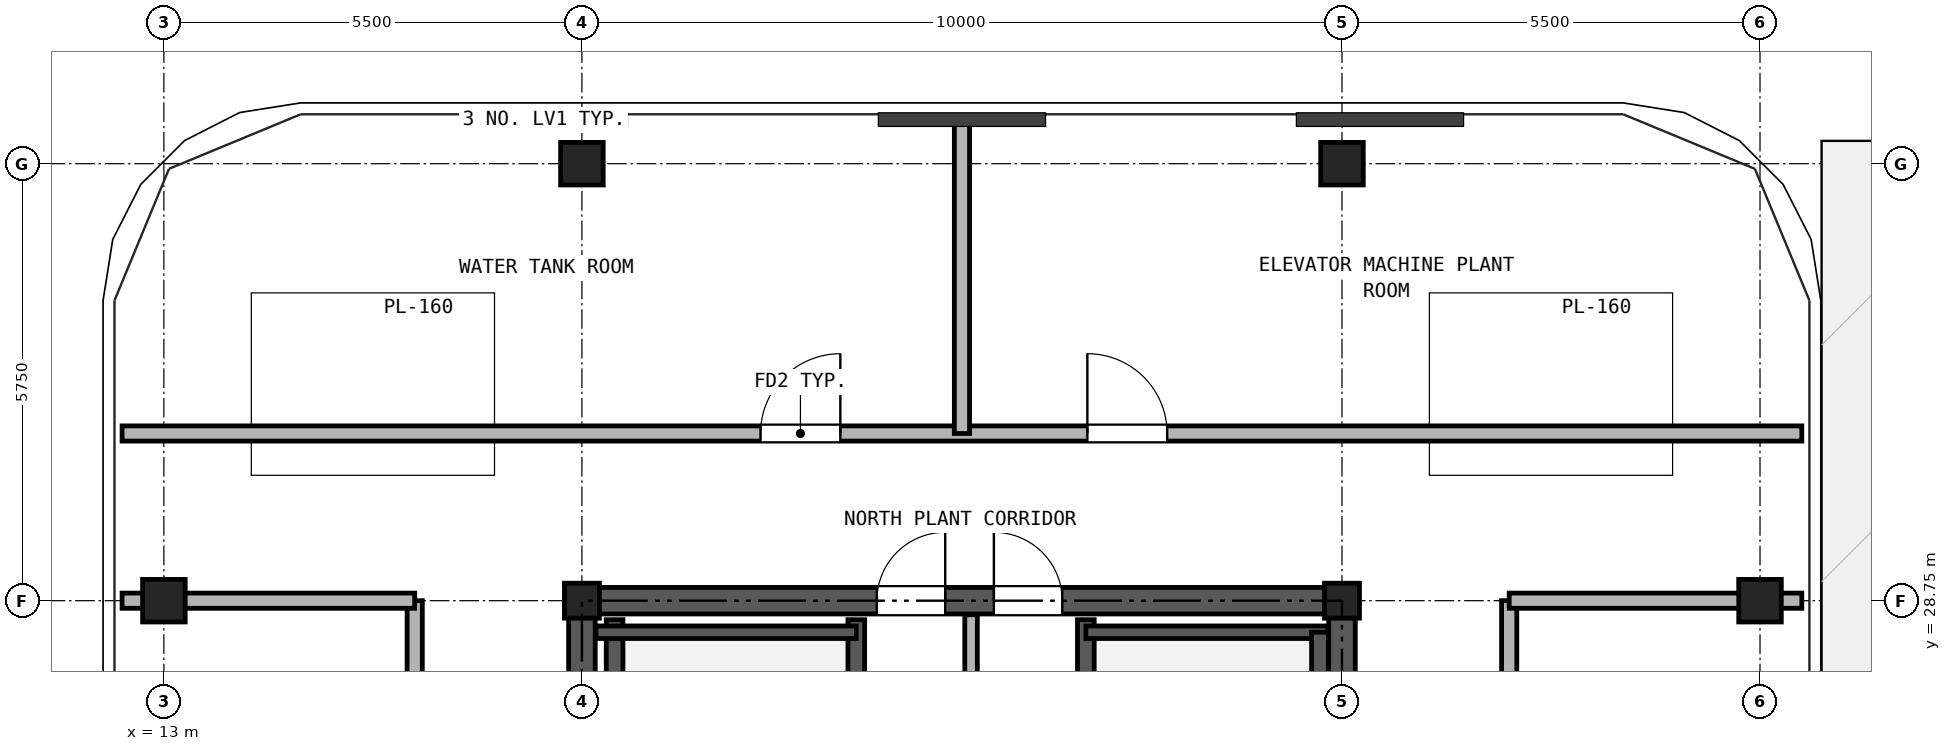
"""IFC4 building model, lengths in metres.
Left out: names, types, materials, properties, quantities, classifications, styles, units other than length and angle.
Written with IfcOpenShell. Run it as: python <this file> out.ifc"""

import sys

from ifc_helpers import new_model, si_unit, direction, frame, frame_2d, origin, origin_2d, place, context, subcontext, project, spatial, rectangle, hollow_rectangle, extrude, source, transform, mapped, element, fill, save


model = new_model("IFC4")
c1 = context("Model", 3, precision=1e-05, world=origin(), true_north=direction((0.0, 1.0)))
c2 = subcontext(c1, "Body", "Model", "MODEL_VIEW")
j1 = project(units=[si_unit("LENGTHUNIT", "METRE"), si_unit("PLANEANGLEUNIT", "RADIAN")], contexts=[c1])
p1 = place(None, origin())
s1 = spatial("IfcSite", under=j1, at=p1, CompositionType="ELEMENT")
p2 = place(p1, origin())
s2 = spatial("IfcBuilding", under=s1, at=p2, CompositionType="ELEMENT")
p3 = place(p2, frame((0.0, 0.0, 285.7)))
s3 = spatial("IfcBuildingStorey", under=s2, at=p3, CompositionType="ELEMENT", Elevation=285.7)
m1 = source(origin(), c2, "Body", "SweptSolid", [
    extrude(hollow_rectangle(XDim=0.56, YDim=0.56, WallThickness=0.03, at=origin_2d()), origin(), (0.0, 0.0, 1.0), 3.38),
])
for number, where, z_axis, x_axis in (
    (1, (18.5, 34.5, 0.0), (0.0, 0.0, 1.0), (1.0, 0.0, 0.0)),
    (2, (28.5, 34.5, 0.0), (0.0, 0.0, 1.0), (1.0, 0.0, 0.0)),
    (3, (13.0, 28.75, 0.0), (0.0, 0.0, 1.0), (1.0, 0.0, 0.0)),
    (4, (34.0, 28.75, 0.0), (0.0, 0.0, 1.0), (1.0, 0.0, 0.0)),
):
    element("IfcColumn", number, at=place(p3, frame(where, z_axis=z_axis, x_axis=x_axis)), inside=s3, PredefinedType="COLUMN", context=c2, shape_type="MappedRepresentation", body=[
        mapped(m1, transform((0.0, 0.0, 0.0), x_axis=(1.0, 0.0, 0.0), y_axis=(0.0, 1.0, 0.0), z_axis=(0.0, 0.0, 1.0), scale=1.0)),
    ])
m2 = source(origin(), c2, "Body", "SweptSolid", [
    extrude(hollow_rectangle(XDim=0.46, YDim=0.46, WallThickness=0.025, at=origin_2d()), origin(), (0.0, 0.0, 1.0), 3.38),
])
for number, where, z_axis, x_axis in (
    (5, (18.5, 28.75, 0.0), (0.0, 0.0, 1.0), (1.0, 0.0, 0.0)),
    (6, (28.5, 28.75, 0.0), (0.0, 0.0, 1.0), (1.0, 0.0, 0.0)),
):
    element("IfcColumn", number, at=place(p3, frame(where, z_axis=z_axis, x_axis=x_axis)), inside=s3, PredefinedType="COLUMN", context=c2, shape_type="MappedRepresentation", body=[
        mapped(m2, transform((0.0, 0.0, 0.0), x_axis=(1.0, 0.0, 0.0), y_axis=(0.0, 1.0, 0.0), z_axis=(0.0, 0.0, 1.0), scale=1.0)),
    ])
p4 = place(p3, frame((18.325, 28.75, 0.0), z_axis=(0.0, 0.0, 1.0), x_axis=(1.0, 0.0, 0.0)))
e7 = element("IfcWall", 7, at=p4, inside=s3, PredefinedType="SHEAR", context=c2, shape_type="SweptSolid", body=[
    extrude(rectangle(XDim=10.35, YDim=0.35, at=frame_2d((5.175, 0.0))), origin(), (0.0, 0.0, 1.0), 3.38),
])
p5 = place(p4, frame((4.055, 0.0, 0.0)))
e8 = element("IfcOpeningElement", 8, at=p5, cuts=e7, PredefinedType="OPENING", context=c2, shape_type="SweptSolid", body=[
    extrude(rectangle(XDim=0.9, YDim=2.05, at=frame_2d((0.45, 1.025))), frame((0.0, 0.185, 0.0), z_axis=(0.0, -1.0, 0.0), x_axis=(1.0, 0.0, 0.0)), (0.0, 0.0, 1.0), 0.37),
])
p6 = place(p4, frame((5.595, 0.0, 0.0)))
e9 = element("IfcOpeningElement", 9, at=p6, cuts=e7, PredefinedType="OPENING", context=c2, shape_type="SweptSolid", body=[
    extrude(rectangle(XDim=0.9, YDim=2.05, at=frame_2d((0.45, 1.025))), frame((0.0, 0.185, 0.0), z_axis=(0.0, -1.0, 0.0), x_axis=(1.0, 0.0, 0.0)), (0.0, 0.0, 1.0), 0.37),
])
p7 = place(p3, frame((18.5, 11.675, 0.0), z_axis=(0.0, 0.0, 1.0), x_axis=(0.0, 1.0, 0.0)))
e10 = element("IfcWall", 10, at=p7, inside=s3, PredefinedType="SHEAR", context=c2, shape_type="SweptSolid", body=[
    extrude(rectangle(XDim=16.9, YDim=0.35, at=frame_2d((8.45, 0.0))), origin(), (0.0, 0.0, 1.0), 3.38),
])
p8 = place(p7, frame((7.475, 0.0, 0.0)))
e11 = element("IfcOpeningElement", 11, at=p8, cuts=e10, PredefinedType="OPENING", context=c2, shape_type="SweptSolid", body=[
    extrude(rectangle(XDim=1.15, YDim=2.2, at=frame_2d((0.575, 1.1))), frame((0.0, 0.185, 0.0), z_axis=(0.0, -1.0, 0.0), x_axis=(1.0, 0.0, 0.0)), (0.0, 0.0, 1.0), 0.37),
])
p9 = place(p3, frame((28.5, 11.675, 0.0), z_axis=(0.0, 0.0, 1.0), x_axis=(0.0, 1.0, 0.0)))
e12 = element("IfcWall", 12, at=p9, inside=s3, PredefinedType="SHEAR", context=c2, shape_type="SweptSolid", body=[
    extrude(rectangle(XDim=16.9, YDim=0.35, at=frame_2d((8.45, 0.0))), origin(), (0.0, 0.0, 1.0), 3.38),
])
p10 = place(p9, frame((7.475, 0.0, 0.0)))
e13 = element("IfcOpeningElement", 13, at=p10, cuts=e12, PredefinedType="OPENING", context=c2, shape_type="SweptSolid", body=[
    extrude(rectangle(XDim=1.15, YDim=2.2, at=frame_2d((0.575, 1.1))), frame((0.0, 0.185, 0.0), z_axis=(0.0, -1.0, 0.0), x_axis=(1.0, 0.0, 0.0)), (0.0, 0.0, 1.0), 0.37),
])
for number, where, z_axis, x_axis in (
    (14, (18.93, 21.39, 0.0), (0.0, 0.0, 1.0), (0.0, 1.0, 0.0)),
    (15, (22.11, 21.39, 0.0), (0.0, 0.0, 1.0), (0.0, 1.0, 0.0)),
    (16, (25.13, 21.39, 0.0), (0.0, 0.0, 1.0), (0.0, 1.0, 0.0)),
):
    element("IfcWall", number, at=place(p3, frame(where, z_axis=z_axis, x_axis=x_axis)), inside=s3, PredefinedType="SOLIDWALL", context=c2, shape_type="SweptSolid", body=[
        extrude(rectangle(XDim=7.11, YDim=0.22, at=frame_2d((3.555, 0.0))), origin(), (0.0, 0.0, 1.0), 3.38),
    ])
p11 = place(p3, frame((18.685, 28.335, 0.0), z_axis=(0.0, 0.0, 1.0), x_axis=(1.0, 0.0, 0.0)))
e17 = element("IfcWall", 17, at=p11, inside=s3, PredefinedType="PARTITIONING", context=c2, shape_type="SweptSolid", body=[
    extrude(rectangle(XDim=3.425, YDim=0.165, at=frame_2d((1.712, 0.0))), origin(), (0.0, 0.0, 1.0), 3.38),
])
p12 = place(p3, frame((25.13, 28.335, 0.0), z_axis=(0.0, 0.0, 1.0), x_axis=(1.0, 0.0, 0.0)))
e18 = element("IfcWall", 18, at=p12, inside=s3, PredefinedType="PARTITIONING", context=c2, shape_type="SweptSolid", body=[
    extrude(rectangle(XDim=3.185, YDim=0.165, at=frame_2d((1.593, 0.0))), origin(), (0.0, 0.0, 1.0), 3.38),
])
p13 = place(p3, frame((28.21, 21.39, 0.0), z_axis=(0.0, 0.0, 1.0), x_axis=(0.0, 1.0, 0.0)))
e19 = element("IfcWall", 19, at=p13, inside=s3, PredefinedType="SOLIDWALL", context=c2, shape_type="SweptSolid", body=[
    extrude(rectangle(XDim=6.945, YDim=0.22, at=frame_2d((3.473, 0.0))), origin(), (0.0, 0.0, 1.0), 3.38),
])
p14 = place(p3, frame((23.62, 24.4, 0.0), z_axis=(0.0, 0.0, 1.0), x_axis=(0.0, 1.0, 0.0)))
e20 = element("IfcWall", 20, at=p14, inside=s3, PredefinedType="PARTITIONING", context=c2, shape_type="SweptSolid", body=[
    extrude(rectangle(XDim=4.165, YDim=0.165, at=frame_2d((2.083, 0.0))), origin(), (0.0, 0.0, 1.0), 3.38),
])
p15 = place(p3, frame((12.45, 30.95, 0.0), z_axis=(0.0, 0.0, 1.0), x_axis=(1.0, 0.0, 0.0)))
e21 = element("IfcWall", 21, at=p15, inside=s3, PredefinedType="PARTITIONING", context=c2, shape_type="SweptSolid", body=[
    extrude(rectangle(XDim=22.1, YDim=0.2, at=frame_2d((11.05, 0.0))), origin(), (0.0, 0.0, 1.0), 3.38),
])
p16 = place(p15, frame((8.4, 0.0, 0.0)))
e22 = element("IfcOpeningElement", 22, at=p16, cuts=e21, PredefinedType="OPENING", context=c2, shape_type="SweptSolid", body=[
    extrude(rectangle(XDim=1.05, YDim=2.15, at=frame_2d((0.525, 1.075))), frame((0.0, 0.11, 0.0), z_axis=(0.0, -1.0, 0.0), x_axis=(1.0, 0.0, 0.0)), (0.0, 0.0, 1.0), 0.22),
])
p17 = place(p15, frame((12.7, 0.0, 0.0)))
e23 = element("IfcOpeningElement", 23, at=p17, cuts=e21, PredefinedType="OPENING", context=c2, shape_type="SweptSolid", body=[
    extrude(rectangle(XDim=1.05, YDim=2.15, at=frame_2d((0.525, 1.075))), frame((0.0, 0.11, 0.0), z_axis=(0.0, -1.0, 0.0), x_axis=(1.0, 0.0, 0.0)), (0.0, 0.0, 1.0), 0.22),
])
p18 = place(p3, frame((16.3, 8.9, 0.0), z_axis=(0.0, 0.0, 1.0), x_axis=(0.0, 1.0, 0.0)))
e24 = element("IfcWall", 24, at=p18, inside=s3, PredefinedType="PARTITIONING", context=c2, shape_type="SweptSolid", body=[
    extrude(rectangle(XDim=19.85, YDim=0.2, at=frame_2d((9.925, 0.0))), origin(), (0.0, 0.0, 1.0), 3.38),
])
p19 = place(p18, frame((4.55, 0.0, 0.0)))
e25 = element("IfcOpeningElement", 25, at=p19, cuts=e24, PredefinedType="OPENING", context=c2, shape_type="SweptSolid", body=[
    extrude(rectangle(XDim=1.05, YDim=2.15, at=frame_2d((0.525, 1.075))), frame((0.0, 0.11, 0.0), z_axis=(0.0, -1.0, 0.0), x_axis=(1.0, 0.0, 0.0)), (0.0, 0.0, 1.0), 0.22),
])
p20 = place(p18, frame((14.475, 0.0, 0.0)))
e26 = element("IfcOpeningElement", 26, at=p20, cuts=e24, PredefinedType="OPENING", context=c2, shape_type="SweptSolid", body=[
    extrude(rectangle(XDim=1.05, YDim=2.15, at=frame_2d((0.525, 1.075))), frame((0.0, 0.11, 0.0), z_axis=(0.0, -1.0, 0.0), x_axis=(1.0, 0.0, 0.0)), (0.0, 0.0, 1.0), 0.22),
])
p21 = place(p3, frame((30.7, 8.9, 0.0), z_axis=(0.0, 0.0, 1.0), x_axis=(0.0, 1.0, 0.0)))
e27 = element("IfcWall", 27, at=p21, inside=s3, PredefinedType="PARTITIONING", context=c2, shape_type="SweptSolid", body=[
    extrude(rectangle(XDim=19.85, YDim=0.2, at=frame_2d((9.925, 0.0))), origin(), (0.0, 0.0, 1.0), 3.38),
])
p22 = place(p21, frame((9.425, 0.0, 0.0)))
e28 = element("IfcOpeningElement", 28, at=p22, cuts=e27, PredefinedType="OPENING", context=c2, shape_type="SweptSolid", body=[
    extrude(rectangle(XDim=1.05, YDim=2.15, at=frame_2d((0.525, 1.075))), frame((0.0, 0.11, 0.0), z_axis=(0.0, -1.0, 0.0), x_axis=(1.0, 0.0, 0.0)), (0.0, 0.0, 1.0), 0.22),
])
for number, where, z_axis, x_axis in (
    (29, (12.45, 28.75, 0.0), (0.0, 0.0, 1.0), (1.0, 0.0, 0.0)),
    (30, (30.7, 28.75, 0.0), (0.0, 0.0, 1.0), (1.0, 0.0, 0.0)),
):
    element("IfcWall", number, at=place(p3, frame(where, z_axis=z_axis, x_axis=x_axis)), inside=s3, PredefinedType="PARTITIONING", context=c2, shape_type="SweptSolid", body=[
        extrude(rectangle(XDim=3.85, YDim=0.2, at=frame_2d((1.925, 0.0))), origin(), (0.0, 0.0, 1.0), 2.905),
    ])
p23 = place(p3, frame((23.5, 30.95, 0.0), z_axis=(0.0, 0.0, 1.0), x_axis=(0.0, 1.0, 0.0)))
e31 = element("IfcWall", 31, at=p23, inside=s3, PredefinedType="PARTITIONING", context=c2, shape_type="SweptSolid", body=[
    extrude(rectangle(XDim=4.1, YDim=0.2, at=frame_2d((2.05, 0.0))), origin(), (0.0, 0.0, 1.0), 3.38),
])
p24 = place(p5, origin())
e32 = element("IfcDoor", 32, at=p24, inside=s3, OperationType="SINGLE_SWING_RIGHT", PredefinedType="DOOR", context=c2, shape_type="SweptSolid", body=[
    extrude(rectangle(XDim=0.9, YDim=2.05, at=frame_2d((0.45, 1.025))), frame((0.0, 0.025, 0.0), z_axis=(0.0, -1.0, 0.0), x_axis=(1.0, 0.0, 0.0)), (0.0, 0.0, 1.0), 0.05),
])
fill(e8, e32)
p25 = place(p6, origin())
e33 = element("IfcDoor", 33, at=p25, inside=s3, OperationType="SINGLE_SWING_LEFT", PredefinedType="DOOR", context=c2, shape_type="SweptSolid", body=[
    extrude(rectangle(XDim=0.9, YDim=2.05, at=frame_2d((0.45, 1.025))), frame((0.0, 0.025, 0.0), z_axis=(0.0, -1.0, 0.0), x_axis=(1.0, 0.0, 0.0)), (0.0, 0.0, 1.0), 0.05),
])
fill(e9, e33)
p26 = place(p16, origin())
e34 = element("IfcDoor", 34, at=p26, inside=s3, OperationType="SINGLE_SWING_RIGHT", PredefinedType="DOOR", context=c2, shape_type="SweptSolid", body=[
    extrude(rectangle(XDim=1.05, YDim=2.15, at=frame_2d((0.525, 1.075))), frame((0.0, 0.025, 0.0), z_axis=(0.0, -1.0, 0.0), x_axis=(1.0, 0.0, 0.0)), (0.0, 0.0, 1.0), 0.05),
])
fill(e22, e34)
p27 = place(p17, origin())
e35 = element("IfcDoor", 35, at=p27, inside=s3, OperationType="SINGLE_SWING_LEFT", PredefinedType="DOOR", context=c2, shape_type="SweptSolid", body=[
    extrude(rectangle(XDim=1.05, YDim=2.15, at=frame_2d((0.525, 1.075))), frame((0.0, 0.025, 0.0), z_axis=(0.0, -1.0, 0.0), x_axis=(1.0, 0.0, 0.0)), (0.0, 0.0, 1.0), 0.05),
])
fill(e23, e35)
save(model, sys.argv[1])
